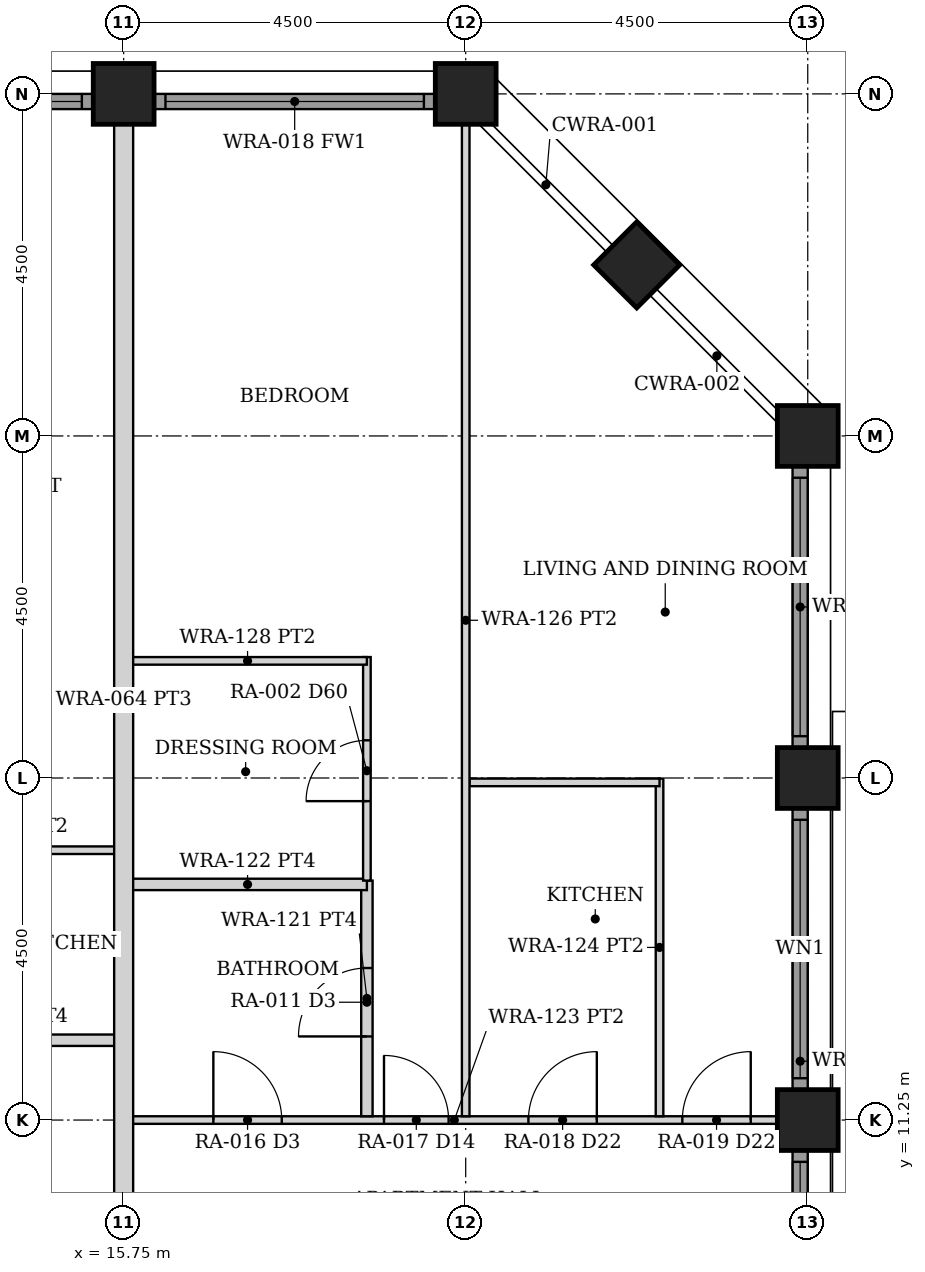
"""IFC4 building model, lengths in metres.
Left out: names, types, materials, properties, quantities, classifications, styles, units other than length and angle.
Written with IfcOpenShell. Run it as: python <this file> out.ifc"""

import sys

from ifc_helpers import new_model, si_unit, direction, frame, frame_2d, origin, origin_2d, place, context, subcontext, project, spatial, rectangle, hollow_rectangle, extrude, element, fill, save


model = new_model("IFC4")
c1 = context("Model", 3, precision=1e-05, world=origin(), true_north=direction((0.0, 1.0)))
c2 = subcontext(c1, "Body", "Model", "MODEL_VIEW")
j1 = project(units=[si_unit("LENGTHUNIT", "METRE"), si_unit("PLANEANGLEUNIT", "RADIAN")], contexts=[c1])
p1 = place(None, origin())
s1 = spatial("IfcSite", under=j1, at=p1, CompositionType="ELEMENT")
p2 = place(p1, origin())
s2 = spatial("IfcBuilding", under=s1, at=p2, CompositionType="ELEMENT")
p3 = place(p2, frame((0.0, 0.0, 26.5)))
s3 = spatial("IfcBuildingStorey", under=s2, at=p3, CompositionType="ELEMENT", Elevation=26.5)
for number, where, z_axis, x_axis in (
    (1, (24.75, 11.25, 0.0), (0.0, 0.0, 1.0), (1.0, 0.0, 0.0)),
    (2, (15.75, 24.75, 0.0), (0.0, 0.0, 1.0), (0.0, 1.0, 0.0)),
    (3, (24.75, 15.75, 0.0), (0.0, 0.0, 1.0), (1.0, 0.0, 0.0)),
    (4, (20.25, 24.75, 0.0), (0.0, 0.0, 1.0), (0.0, 1.0, 0.0)),
    (5, (24.75, 20.25, 0.0), (0.0, 0.0, 1.0), (1.0, 0.0, 0.0)),
    (6, (22.5, 22.5, 0.0), (0.0, 0.0, 1.0), (0.707, 0.707, 0.0)),
):
    element("IfcColumn", number, at=place(p3, frame(where, z_axis=z_axis, x_axis=x_axis)), inside=s3, PredefinedType="COLUMN", context=c2, shape_type="SweptSolid", body=[
        extrude(hollow_rectangle(XDim=0.8, YDim=0.8, WallThickness=0.08, at=origin_2d()), origin(), (0.0, 0.0, 1.0), 3.5),
    ])
p4 = place(p3, frame((24.65, 7.155, 0.0), z_axis=(0.0, 0.0, 1.0), x_axis=(0.0, 1.0, 0.0)))
e7 = element("IfcWall", 7, at=p4, inside=s3, PredefinedType="SOLIDWALL", context=c2, shape_type="SweptSolid", body=[
    extrude(rectangle(XDim=3.69, YDim=0.2, at=frame_2d((1.845, 0.0))), origin(), (0.0, 0.0, 1.0), 2.379),
])
p5 = place(p4, frame((0.145, 0.0, 0.3)))
e8 = element("IfcOpeningElement", 8, at=p5, cuts=e7, PredefinedType="OPENING", context=c2, shape_type="SweptSolid", body=[
    extrude(rectangle(XDim=3.4, YDim=1.929, at=frame_2d((1.7, 0.964))), frame((0.0, 0.11, 0.0), z_axis=(0.0, -1.0, 0.0), x_axis=(1.0, 0.0, 0.0)), (0.0, 0.0, 1.0), 0.22),
])
p6 = place(p3, frame((24.65, 11.655, 0.0), z_axis=(0.0, 0.0, 1.0), x_axis=(0.0, 1.0, 0.0)))
e9 = element("IfcWall", 9, at=p6, inside=s3, PredefinedType="SOLIDWALL", context=c2, shape_type="SweptSolid", body=[
    extrude(rectangle(XDim=3.69, YDim=0.2, at=frame_2d((1.845, 0.0))), origin(), (0.0, 0.0, 1.0), 2.379),
])
p7 = place(p6, frame((0.145, 0.0, 0.3)))
e10 = element("IfcOpeningElement", 10, at=p7, cuts=e9, PredefinedType="OPENING", context=c2, shape_type="SweptSolid", body=[
    extrude(rectangle(XDim=3.4, YDim=1.929, at=frame_2d((1.7, 0.964))), frame((0.0, 0.11, 0.0), z_axis=(0.0, -1.0, 0.0), x_axis=(1.0, 0.0, 0.0)), (0.0, 0.0, 1.0), 0.22),
])
p8 = place(p3, frame((24.65, 16.155, 0.0), z_axis=(0.0, 0.0, 1.0), x_axis=(0.0, 1.0, 0.0)))
e11 = element("IfcWall", 11, at=p8, inside=s3, PredefinedType="SOLIDWALL", context=c2, shape_type="SweptSolid", body=[
    extrude(rectangle(XDim=3.69, YDim=0.2, at=frame_2d((1.845, 0.0))), origin(), (0.0, 0.0, 1.0), 2.379),
])
p9 = place(p8, frame((0.145, 0.0, 0.3)))
e12 = element("IfcOpeningElement", 12, at=p9, cuts=e11, PredefinedType="OPENING", context=c2, shape_type="SweptSolid", body=[
    extrude(rectangle(XDim=3.4, YDim=1.929, at=frame_2d((1.7, 0.964))), frame((0.0, 0.11, 0.0), z_axis=(0.0, -1.0, 0.0), x_axis=(1.0, 0.0, 0.0)), (0.0, 0.0, 1.0), 0.22),
])
p10 = place(p3, frame((11.655, 24.65, 0.0), z_axis=(0.0, 0.0, 1.0), x_axis=(1.0, 0.0, 0.0)))
e13 = element("IfcWall", 13, at=p10, inside=s3, PredefinedType="SOLIDWALL", context=c2, shape_type="SweptSolid", body=[
    extrude(rectangle(XDim=3.69, YDim=0.2, at=frame_2d((1.845, 0.0))), origin(), (0.0, 0.0, 1.0), 2.379),
])
p11 = place(p10, frame((0.145, 0.0, 0.3)))
e14 = element("IfcOpeningElement", 14, at=p11, cuts=e13, PredefinedType="OPENING", context=c2, shape_type="SweptSolid", body=[
    extrude(rectangle(XDim=3.4, YDim=1.929, at=frame_2d((1.7, 0.964))), frame((0.0, 0.11, 0.0), z_axis=(0.0, -1.0, 0.0), x_axis=(1.0, 0.0, 0.0)), (0.0, 0.0, 1.0), 0.22),
])
p12 = place(p3, frame((16.155, 24.65, 0.0), z_axis=(0.0, 0.0, 1.0), x_axis=(1.0, 0.0, 0.0)))
e15 = element("IfcWall", 15, at=p12, inside=s3, PredefinedType="SOLIDWALL", context=c2, shape_type="SweptSolid", body=[
    extrude(rectangle(XDim=3.69, YDim=0.2, at=frame_2d((1.845, 0.0))), origin(), (0.0, 0.0, 1.0), 2.379),
])
p13 = place(p12, frame((0.145, 0.0, 0.3)))
e16 = element("IfcOpeningElement", 16, at=p13, cuts=e15, PredefinedType="OPENING", context=c2, shape_type="SweptSolid", body=[
    extrude(rectangle(XDim=3.4, YDim=1.929, at=frame_2d((1.7, 0.964))), frame((0.0, 0.11, 0.0), z_axis=(0.0, -1.0, 0.0), x_axis=(1.0, 0.0, 0.0)), (0.0, 0.0, 1.0), 0.22),
])
p14 = place(p3, frame((12.6, 12.3, 0.0), z_axis=(0.0, 0.0, 1.0), x_axis=(1.0, 0.0, 0.0)))
e17 = element("IfcWall", 17, at=p14, inside=s3, PredefinedType="PARTITIONING", context=c2, shape_type="SweptSolid", body=[
    extrude(rectangle(XDim=3.05, YDim=0.15, at=frame_2d((1.525, 0.0))), origin(), (0.0, 0.0, 1.0), 2.373),
])
p15 = place(p3, frame((12.6, 14.8, 0.0), z_axis=(0.0, 0.0, 1.0), x_axis=(1.0, 0.0, 0.0)))
e18 = element("IfcWall", 18, at=p15, inside=s3, PredefinedType="PARTITIONING", context=c2, shape_type="SweptSolid", body=[
    extrude(rectangle(XDim=3.05, YDim=0.1, at=frame_2d((1.525, 0.0))), origin(), (0.0, 0.0, 1.0), 2.373),
])
p16 = place(p3, frame((15.85, 11.25, 0.0), z_axis=(0.0, 0.0, 1.0), x_axis=(1.0, 0.0, 0.0)))
e19 = element("IfcWall", 19, at=p16, inside=s3, PredefinedType="PARTITIONING", context=c2, shape_type="SweptSolid", body=[
    extrude(rectangle(XDim=8.5, YDim=0.1, at=frame_2d((4.25, 0.0))), origin(), (0.0, 0.0, 1.0), 2.373),
])
p17 = place(p16, frame((5.225, 0.0, 0.0)))
e20 = element("IfcOpeningElement", 20, at=p17, cuts=e19, PredefinedType="OPENING", context=c2, shape_type="SweptSolid", body=[
    extrude(rectangle(XDim=0.9, YDim=2.1, at=frame_2d((0.45, 1.05))), frame((0.0, 0.06, 0.0), z_axis=(0.0, -1.0, 0.0), x_axis=(1.0, 0.0, 0.0)), (0.0, 0.0, 1.0), 0.12),
])
p18 = place(p16, frame((7.25, 0.0, 0.0)))
e21 = element("IfcOpeningElement", 21, at=p18, cuts=e19, PredefinedType="OPENING", context=c2, shape_type="SweptSolid", body=[
    extrude(rectangle(XDim=0.9, YDim=2.1, at=frame_2d((0.45, 1.05))), frame((0.0, 0.06, 0.0), z_axis=(0.0, -1.0, 0.0), x_axis=(1.0, 0.0, 0.0)), (0.0, 0.0, 1.0), 0.12),
])
p19 = place(p16, frame((3.325, 0.0, 0.0)))
e22 = element("IfcOpeningElement", 22, at=p19, cuts=e19, PredefinedType="OPENING", context=c2, shape_type="SweptSolid", body=[
    extrude(rectangle(XDim=0.85, YDim=2.1, at=frame_2d((0.425, 1.05))), frame((0.0, 0.06, 0.0), z_axis=(0.0, -1.0, 0.0), x_axis=(1.0, 0.0, 0.0)), (0.0, 0.0, 1.0), 0.12),
])
p20 = place(p16, frame((1.08, 0.0, 0.0)))
e23 = element("IfcOpeningElement", 23, at=p20, cuts=e19, PredefinedType="OPENING", context=c2, shape_type="SweptSolid", body=[
    extrude(rectangle(XDim=0.9, YDim=2.1, at=frame_2d((0.45, 1.05))), frame((0.0, 0.06, 0.0), z_axis=(0.0, -1.0, 0.0), x_axis=(1.0, 0.0, 0.0)), (0.0, 0.0, 1.0), 0.12),
])
p21 = place(p3, frame((22.8, 11.3, 0.0), z_axis=(0.0, 0.0, 1.0), x_axis=(0.0, 1.0, 0.0)))
e24 = element("IfcWall", 24, at=p21, inside=s3, PredefinedType="PARTITIONING", context=c2, shape_type="SweptSolid", body=[
    extrude(rectangle(XDim=4.442, YDim=0.1, at=frame_2d((2.221, 0.0))), origin(), (0.0, 0.0, 1.0), 2.373),
])
p22 = place(p3, frame((20.3, 15.692, 0.0), z_axis=(0.0, 0.0, 1.0), x_axis=(1.0, 0.0, 0.0)))
e25 = element("IfcWall", 25, at=p22, inside=s3, PredefinedType="PARTITIONING", context=c2, shape_type="SweptSolid", body=[
    extrude(rectangle(XDim=2.5, YDim=0.1, at=frame_2d((1.25, 0.0))), origin(), (0.0, 0.0, 1.0), 2.373),
])
p23 = place(p3, frame((20.25, 11.3, 0.0), z_axis=(0.0, 0.0, 1.0), x_axis=(0.0, 1.0, 0.0)))
e26 = element("IfcWall", 26, at=p23, inside=s3, PredefinedType="PARTITIONING", context=c2, shape_type="SweptSolid", body=[
    extrude(rectangle(XDim=13.05, YDim=0.1, at=frame_2d((6.525, 0.0))), origin(), (0.0, 0.0, 1.0), 2.373),
])
p24 = place(p3, frame((18.95, 11.3, 0.0), z_axis=(0.0, 0.0, 1.0), x_axis=(0.0, 1.0, 0.0)))
e27 = element("IfcWall", 27, at=p24, inside=s3, PredefinedType="PARTITIONING", context=c2, shape_type="SweptSolid", body=[
    extrude(rectangle(XDim=3.1, YDim=0.15, at=frame_2d((1.55, 0.0))), origin(), (0.0, 0.0, 1.0), 2.373),
])
p25 = place(p24, frame((1.05, 0.0, 0.0)))
e28 = element("IfcOpeningElement", 28, at=p25, cuts=e27, PredefinedType="OPENING", context=c2, shape_type="SweptSolid", body=[
    extrude(rectangle(XDim=0.9, YDim=2.1, at=frame_2d((0.45, 1.05))), frame((0.0, 0.085, 0.0), z_axis=(0.0, -1.0, 0.0), x_axis=(1.0, 0.0, 0.0)), (0.0, 0.0, 1.0), 0.17),
])
p26 = place(p3, frame((15.81, 14.35, 0.0), z_axis=(0.0, 0.0, 1.0), x_axis=(1.0, 0.0, 0.0)))
e29 = element("IfcWall", 29, at=p26, inside=s3, PredefinedType="PARTITIONING", context=c2, shape_type="SweptSolid", body=[
    extrude(rectangle(XDim=3.14, YDim=0.15, at=frame_2d((1.57, 0.0))), origin(), (0.0, 0.0, 1.0), 2.373),
])
p27 = place(p3, frame((18.95, 14.4, 0.0), z_axis=(0.0, 0.0, 1.0), x_axis=(0.0, 1.0, 0.0)))
e30 = element("IfcWall", 30, at=p27, inside=s3, PredefinedType="PARTITIONING", context=c2, shape_type="SweptSolid", body=[
    extrude(rectangle(XDim=2.941, YDim=0.1, at=frame_2d((1.47, 0.0))), origin(), (0.0, 0.0, 1.0), 2.373),
])
p28 = place(p27, frame((1.045, 0.0, 0.0)))
e31 = element("IfcOpeningElement", 31, at=p28, cuts=e30, PredefinedType="OPENING", context=c2, shape_type="SweptSolid", body=[
    extrude(rectangle(XDim=0.8, YDim=2.1, at=frame_2d((0.4, 1.05))), frame((0.0, 0.06, 0.0), z_axis=(0.0, -1.0, 0.0), x_axis=(1.0, 0.0, 0.0)), (0.0, 0.0, 1.0), 0.12),
])
p29 = place(p3, frame((15.81, 17.291, 0.0), z_axis=(0.0, 0.0, 1.0), x_axis=(1.0, 0.0, 0.0)))
e32 = element("IfcWall", 32, at=p29, inside=s3, PredefinedType="PARTITIONING", context=c2, shape_type="SweptSolid", body=[
    extrude(rectangle(XDim=3.14, YDim=0.1, at=frame_2d((1.57, 0.0))), origin(), (0.0, 0.0, 1.0), 2.373),
])
p30 = place(p3, frame((15.75, 9.2, 0.0), z_axis=(0.0, 0.0, 1.0), x_axis=(0.0, 1.0, 0.0)))
e33 = element("IfcWall", 33, at=p30, inside=s3, PredefinedType="PARTITIONING", context=c2, shape_type="SweptSolid", body=[
    extrude(rectangle(XDim=15.15, YDim=0.25, at=frame_2d((7.575, 0.0))), origin(), (0.0, 0.0, 1.0), 2.373),
])
p31 = place(p5, origin())
e34 = element("IfcWindow", 34, at=p31, inside=s3, PartitioningType="SINGLE_PANEL", PredefinedType="WINDOW", context=c2, shape_type="SweptSolid", body=[
    extrude(rectangle(XDim=3.4, YDim=1.929, at=frame_2d((1.7, 0.964))), frame((0.0, 0.03, 0.0), z_axis=(0.0, -1.0, 0.0), x_axis=(1.0, 0.0, 0.0)), (0.0, 0.0, 1.0), 0.06),
])
fill(e8, e34)
p32 = place(p7, origin())
e35 = element("IfcWindow", 35, at=p32, inside=s3, PartitioningType="SINGLE_PANEL", PredefinedType="WINDOW", context=c2, shape_type="SweptSolid", body=[
    extrude(rectangle(XDim=3.4, YDim=1.929, at=frame_2d((1.7, 0.964))), frame((0.0, 0.03, 0.0), z_axis=(0.0, -1.0, 0.0), x_axis=(1.0, 0.0, 0.0)), (0.0, 0.0, 1.0), 0.06),
])
fill(e10, e35)
p33 = place(p9, origin())
e36 = element("IfcWindow", 36, at=p33, inside=s3, PartitioningType="SINGLE_PANEL", PredefinedType="WINDOW", context=c2, shape_type="SweptSolid", body=[
    extrude(rectangle(XDim=3.4, YDim=1.929, at=frame_2d((1.7, 0.964))), frame((0.0, 0.03, 0.0), z_axis=(0.0, -1.0, 0.0), x_axis=(1.0, 0.0, 0.0)), (0.0, 0.0, 1.0), 0.06),
])
fill(e12, e36)
p34 = place(p11, origin())
e37 = element("IfcWindow", 37, at=p34, inside=s3, PartitioningType="SINGLE_PANEL", PredefinedType="WINDOW", context=c2, shape_type="SweptSolid", body=[
    extrude(rectangle(XDim=3.4, YDim=1.929, at=frame_2d((1.7, 0.964))), frame((0.0, 0.03, 0.0), z_axis=(0.0, -1.0, 0.0), x_axis=(1.0, 0.0, 0.0)), (0.0, 0.0, 1.0), 0.06),
])
fill(e14, e37)
p35 = place(p13, origin())
e38 = element("IfcWindow", 38, at=p35, inside=s3, PartitioningType="SINGLE_PANEL", PredefinedType="WINDOW", context=c2, shape_type="SweptSolid", body=[
    extrude(rectangle(XDim=3.4, YDim=1.929, at=frame_2d((1.7, 0.964))), frame((0.0, 0.03, 0.0), z_axis=(0.0, -1.0, 0.0), x_axis=(1.0, 0.0, 0.0)), (0.0, 0.0, 1.0), 0.06),
])
fill(e16, e38)
p36 = place(p17, origin())
e39 = element("IfcDoor", 39, at=p36, inside=s3, OperationType="SINGLE_SWING_RIGHT", PredefinedType="DOOR", context=c2, shape_type="SweptSolid", body=[
    extrude(rectangle(XDim=0.9, YDim=2.1, at=frame_2d((0.45, 1.05))), frame((0.0, 0.025, 0.0), z_axis=(0.0, -1.0, 0.0), x_axis=(1.0, 0.0, 0.0)), (0.0, 0.0, 1.0), 0.05),
])
fill(e20, e39)
p37 = place(p18, origin())
e40 = element("IfcDoor", 40, at=p37, inside=s3, OperationType="SINGLE_SWING_RIGHT", PredefinedType="DOOR", context=c2, shape_type="SweptSolid", body=[
    extrude(rectangle(XDim=0.9, YDim=2.1, at=frame_2d((0.45, 1.05))), frame((0.0, 0.025, 0.0), z_axis=(0.0, -1.0, 0.0), x_axis=(1.0, 0.0, 0.0)), (0.0, 0.0, 1.0), 0.05),
])
fill(e21, e40)
p38 = place(p19, origin())
e41 = element("IfcDoor", 41, at=p38, inside=s3, OperationType="SINGLE_SWING_LEFT", PredefinedType="DOOR", context=c2, shape_type="SweptSolid", body=[
    extrude(rectangle(XDim=0.85, YDim=2.1, at=frame_2d((0.425, 1.05))), frame((0.0, 0.025, 0.0), z_axis=(0.0, -1.0, 0.0), x_axis=(1.0, 0.0, 0.0)), (0.0, 0.0, 1.0), 0.05),
])
fill(e22, e41)
p39 = place(p25, origin())
e42 = element("IfcDoor", 42, at=p39, inside=s3, OperationType="SINGLE_SWING_LEFT", PredefinedType="DOOR", context=c2, shape_type="SweptSolid", body=[
    extrude(rectangle(XDim=0.9, YDim=2.1, at=frame_2d((0.45, 1.05))), frame((0.0, 0.025, 0.0), z_axis=(0.0, -1.0, 0.0), x_axis=(1.0, 0.0, 0.0)), (0.0, 0.0, 1.0), 0.05),
])
fill(e28, e42)
p40 = place(p20, origin())
e43 = element("IfcDoor", 43, at=p40, inside=s3, OperationType="SINGLE_SWING_LEFT", PredefinedType="DOOR", context=c2, shape_type="SweptSolid", body=[
    extrude(rectangle(XDim=0.9, YDim=2.1, at=frame_2d((0.45, 1.05))), frame((0.0, 0.025, 0.0), z_axis=(0.0, -1.0, 0.0), x_axis=(1.0, 0.0, 0.0)), (0.0, 0.0, 1.0), 0.05),
])
fill(e23, e43)
p41 = place(p28, origin())
e44 = element("IfcDoor", 44, at=p41, inside=s3, OperationType="SINGLE_SWING_LEFT", PredefinedType="DOOR", context=c2, shape_type="SweptSolid", body=[
    extrude(rectangle(XDim=0.8, YDim=2.1, at=frame_2d((0.4, 1.05))), frame((0.0, 0.025, 0.0), z_axis=(0.0, -1.0, 0.0), x_axis=(1.0, 0.0, 0.0)), (0.0, 0.0, 1.0), 0.05),
])
fill(e31, e44)
save(model, sys.argv[1])
